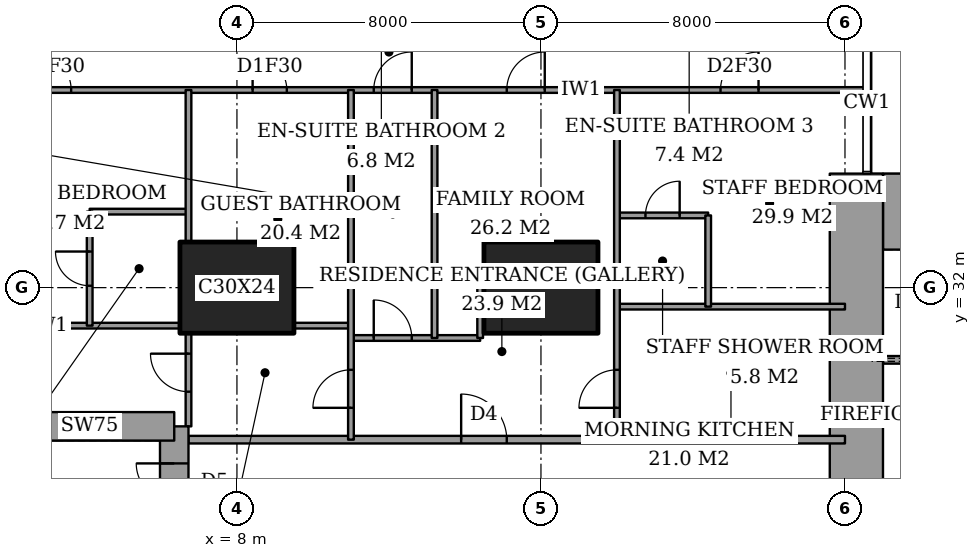
"""IFC4 building model, lengths in metres.
Left out: names, types, materials, properties, quantities, classifications, styles, units other than length and angle.
Written with IfcOpenShell. Run it as: python <this file> out.ifc"""

import sys

from ifc_helpers import new_model, si_unit, direction, frame, frame_2d, origin, origin_2d, place, context, subcontext, project, spatial, rectangle, extrude, element, fill, save


model = new_model("IFC4")
c1 = context("Model", 3, precision=1e-05, world=origin(), true_north=direction((0.0, 1.0)))
c2 = subcontext(c1, "Body", "Model", "MODEL_VIEW")
j1 = project(units=[si_unit("LENGTHUNIT", "METRE"), si_unit("PLANEANGLEUNIT", "RADIAN")], contexts=[c1])
p1 = place(None, origin())
s1 = spatial("IfcSite", under=j1, at=p1, CompositionType="ELEMENT")
p2 = place(p1, origin())
s2 = spatial("IfcBuilding", under=s1, at=p2, CompositionType="ELEMENT")
p3 = place(p2, frame((0.0, 0.0, 207.4)))
s3 = spatial("IfcBuildingStorey", under=s2, at=p3, CompositionType="ELEMENT", Elevation=207.4)
for number, where, z_axis, x_axis in (
    (1, (8.0, 32.0, 0.0), (0.0, 0.0, 1.0), (1.0, 0.0, 0.0)),
    (2, (16.0, 32.0, 0.0), (0.0, 0.0, 1.0), (1.0, 0.0, 0.0)),
):
    element("IfcColumn", number, at=place(p3, frame(where, z_axis=z_axis, x_axis=x_axis)), inside=s3, PredefinedType="COLUMN", context=c2, shape_type="SweptSolid", body=[
        extrude(rectangle(XDim=3.0, YDim=2.4, at=origin_2d()), origin(), (0.0, 0.0, 1.0), 3.6),
    ])
p4 = place(p3, frame((25.0, 34.0, 0.0), z_axis=(0.0, 0.0, 1.0), x_axis=(1.0, 0.0, 0.0)))
e3 = element("IfcWall", 3, at=p4, inside=s3, PredefinedType="SHEAR", context=c2, shape_type="SweptSolid", body=[
    extrude(rectangle(XDim=3.15, YDim=2.0, at=frame_2d((1.575, 0.0))), origin(), (0.0, 0.0, 1.0), 3.6),
])
p5 = place(p3, frame((24.3, 23.15, 0.0), z_axis=(0.0, 0.0, 1.0), x_axis=(0.0, 1.0, 0.0)))
e4 = element("IfcWall", 4, at=p5, inside=s3, PredefinedType="SHEAR", context=c2, shape_type="SweptSolid", body=[
    extrude(rectangle(XDim=11.85, YDim=1.4, at=frame_2d((5.925, 0.0))), origin(), (0.0, 0.0, 1.0), 3.6),
])
p6 = place(p5, frame((0.75, 0.0, 0.0)))
e5 = element("IfcOpeningElement", 5, at=p6, cuts=e4, PredefinedType="OPENING", context=c2, shape_type="SweptSolid", body=[
    extrude(rectangle(XDim=1.8, YDim=2.4, at=frame_2d((0.9, 1.2))), frame((0.0, 0.71, 0.0), z_axis=(0.0, -1.0, 0.0), x_axis=(1.0, 0.0, 0.0)), (0.0, 0.0, 1.0), 1.42),
])
p7 = place(p3, frame((6.35, 19.65, 0.0), z_axis=(0.0, 0.0, 1.0), x_axis=(0.0, 1.0, 0.0)))
e6 = element("IfcWall", 6, at=p7, inside=s3, PredefinedType="SHEAR", context=c2, shape_type="SweptSolid", body=[
    extrude(rectangle(XDim=8.7, YDim=0.75, at=frame_2d((4.35, 0.0))), origin(), (0.0, 0.0, 1.0), 3.6),
])
p8 = place(p7, frame((6.725, 0.0, 0.0)))
e7 = element("IfcOpeningElement", 7, at=p8, cuts=e6, PredefinedType="OPENING", context=c2, shape_type="SweptSolid", body=[
    extrude(rectangle(XDim=1.0, YDim=2.1, at=frame_2d((0.5, 1.05))), frame((0.0, 0.385, 0.0), z_axis=(0.0, -1.0, 0.0), x_axis=(1.0, 0.0, 0.0)), (0.0, 0.0, 1.0), 0.77),
])
p9 = place(p3, frame((6.35, 28.35, 0.0), z_axis=(0.0, 0.0, 1.0), x_axis=(-1.0, 0.0, 0.0)))
e8 = element("IfcWall", 8, at=p9, inside=s3, PredefinedType="SHEAR", context=c2, shape_type="SweptSolid", body=[
    extrude(rectangle(XDim=4.45, YDim=0.75, at=frame_2d((2.225, 0.0))), origin(), (0.0, 0.0, 1.0), 3.6),
])
p10 = place(p3, frame((6.725, 28.0, 0.0), z_axis=(0.0, 0.0, 1.0), x_axis=(1.0, 0.0, 0.0)))
e9 = element("IfcWall", 9, at=p10, inside=s3, PredefinedType="PARTITIONING", context=c2, shape_type="SweptSolid", body=[
    extrude(rectangle(XDim=17.275, YDim=0.2, at=frame_2d((8.637, 0.0))), origin(), (0.0, 0.0, 1.0), 3.35),
])
p11 = place(p10, frame((7.175, 0.0, 0.0)))
e10 = element("IfcOpeningElement", 10, at=p11, cuts=e9, PredefinedType="OPENING", context=c2, shape_type="SweptSolid", body=[
    extrude(rectangle(XDim=1.2, YDim=2.4, at=frame_2d((0.6, 1.2))), frame((0.0, 0.11, 0.0), z_axis=(0.0, -1.0, 0.0), x_axis=(1.0, 0.0, 0.0)), (0.0, 0.0, 1.0), 0.22),
])
p12 = place(p3, frame((11.0, 30.675, 0.0), z_axis=(0.0, 0.0, 1.0), x_axis=(1.0, 0.0, 0.0)))
e11 = element("IfcWall", 11, at=p12, inside=s3, PredefinedType="PARTITIONING", context=c2, shape_type="SweptSolid", body=[
    extrude(rectangle(XDim=3.4, YDim=0.15, at=frame_2d((1.7, 0.0))), origin(), (0.0, 0.0, 1.0), 3.35),
])
p13 = place(p12, frame((0.6, 0.0, 0.0)))
e12 = element("IfcOpeningElement", 12, at=p13, cuts=e11, PredefinedType="OPENING", context=c2, shape_type="SweptSolid", body=[
    extrude(rectangle(XDim=1.0, YDim=2.1, at=frame_2d((0.5, 1.05))), frame((0.0, 0.085, 0.0), z_axis=(0.0, -1.0, 0.0), x_axis=(1.0, 0.0, 0.0)), (0.0, 0.0, 1.0), 0.17),
])
p14 = place(p3, frame((-0.45, 31.0, 0.0), z_axis=(0.0, 0.0, 1.0), x_axis=(1.0, 0.0, 0.0)))
e13 = element("IfcWall", 13, at=p14, inside=s3, PredefinedType="PARTITIONING", context=c2, shape_type="SweptSolid", body=[
    extrude(rectangle(XDim=6.95, YDim=0.15, at=frame_2d((3.475, 0.0))), origin(), (0.0, 0.0, 1.0), 3.35),
])
p15 = place(p3, frame((9.5, 31.0, 0.0), z_axis=(0.0, 0.0, 1.0), x_axis=(1.0, 0.0, 0.0)))
e14 = element("IfcWall", 14, at=p15, inside=s3, PredefinedType="PARTITIONING", context=c2, shape_type="SweptSolid", body=[
    extrude(rectangle(XDim=1.5, YDim=0.15, at=frame_2d((0.75, 0.0))), origin(), (0.0, 0.0, 1.0), 3.35),
])
p16 = place(p3, frame((18.0, 31.5, 0.0), z_axis=(0.0, 0.0, 1.0), x_axis=(1.0, 0.0, 0.0)))
e15 = element("IfcWall", 15, at=p16, inside=s3, PredefinedType="PARTITIONING", context=c2, shape_type="SweptSolid", body=[
    extrude(rectangle(XDim=6.0, YDim=0.15, at=frame_2d((3.0, 0.0))), origin(), (0.0, 0.0, 1.0), 3.35),
])
p17 = place(p3, frame((17.5, 32.1, 0.0), z_axis=(0.0, 0.0, 1.0), x_axis=(1.0, 0.0, 0.0)))
e16 = element("IfcWall", 16, at=p17, inside=s3, PredefinedType="PARTITIONING", context=c2, shape_type="SweptSolid", body=[
    extrude(rectangle(XDim=0.5, YDim=0.15, at=frame_2d((0.25, 0.0))), origin(), (0.0, 0.0, 1.0), 2.634),
])
p18 = place(p3, frame((18.0, 33.9, 0.0), z_axis=(0.0, 0.0, 1.0), x_axis=(1.0, 0.0, 0.0)))
e17 = element("IfcWall", 17, at=p18, inside=s3, PredefinedType="PARTITIONING", context=c2, shape_type="SweptSolid", body=[
    extrude(rectangle(XDim=2.4, YDim=0.15, at=frame_2d((1.2, 0.0))), origin(), (0.0, 0.0, 1.0), 3.35),
])
p19 = place(p18, frame((0.75, 0.0, 0.0)))
e18 = element("IfcOpeningElement", 18, at=p19, cuts=e17, PredefinedType="OPENING", context=c2, shape_type="SweptSolid", body=[
    extrude(rectangle(XDim=0.9, YDim=2.1, at=frame_2d((0.45, 1.05))), frame((0.0, 0.085, 0.0), z_axis=(0.0, -1.0, 0.0), x_axis=(1.0, 0.0, 0.0)), (0.0, 0.0, 1.0), 0.17),
])
p20 = place(p3, frame((4.125, 34.0, 0.0), z_axis=(0.0, 0.0, 1.0), x_axis=(1.0, 0.0, 0.0)))
e19 = element("IfcWall", 19, at=p20, inside=s3, PredefinedType="PARTITIONING", context=c2, shape_type="SweptSolid", body=[
    extrude(rectangle(XDim=2.6, YDim=0.15, at=frame_2d((1.3, 0.0))), origin(), (0.0, 0.0, 1.0), 3.35),
])
p21 = place(p3, frame((-0.45, 37.2, 0.0), z_axis=(0.0, 0.0, 1.0), x_axis=(1.0, 0.0, 0.0)))
e20 = element("IfcWall", 20, at=p21, inside=s3, PredefinedType="PARTITIONING", context=c2, shape_type="SweptSolid", body=[
    extrude(rectangle(XDim=25.011, YDim=0.15, at=frame_2d((12.505, 0.0))), origin(), (0.0, 0.0, 1.0), 3.35),
])
p22 = place(p21, frame((12.05, 0.0, 0.0)))
e21 = element("IfcOpeningElement", 21, at=p22, cuts=e20, PredefinedType="OPENING", context=c2, shape_type="SweptSolid", body=[
    extrude(rectangle(XDim=1.0, YDim=2.1, at=frame_2d((0.5, 1.05))), frame((0.0, 0.085, 0.0), z_axis=(0.0, -1.0, 0.0), x_axis=(1.0, 0.0, 0.0)), (0.0, 0.0, 1.0), 0.17),
])
p23 = place(p21, frame((3.087, 0.0, 0.0)))
e22 = element("IfcOpeningElement", 22, at=p23, cuts=e20, PredefinedType="OPENING", context=c2, shape_type="SweptSolid", body=[
    extrude(rectangle(XDim=1.0, YDim=2.1, at=frame_2d((0.5, 1.05))), frame((0.0, 0.085, 0.0), z_axis=(0.0, -1.0, 0.0), x_axis=(1.0, 0.0, 0.0)), (0.0, 0.0, 1.0), 0.17),
])
p24 = place(p21, frame((8.863, 0.0, 0.0)))
e23 = element("IfcOpeningElement", 23, at=p24, cuts=e20, PredefinedType="OPENING", context=c2, shape_type="SweptSolid", body=[
    extrude(rectangle(XDim=0.9, YDim=2.1, at=frame_2d((0.45, 1.05))), frame((0.0, 0.085, 0.0), z_axis=(0.0, -1.0, 0.0), x_axis=(1.0, 0.0, 0.0)), (0.0, 0.0, 1.0), 0.17),
])
p25 = place(p21, frame((15.55, 0.0, 0.0)))
e24 = element("IfcOpeningElement", 24, at=p25, cuts=e20, PredefinedType="OPENING", context=c2, shape_type="SweptSolid", body=[
    extrude(rectangle(XDim=1.0, YDim=2.1, at=frame_2d((0.5, 1.05))), frame((0.0, 0.085, 0.0), z_axis=(0.0, -1.0, 0.0), x_axis=(1.0, 0.0, 0.0)), (0.0, 0.0, 1.0), 0.17),
])
p26 = place(p21, frame((21.175, 0.0, 0.0)))
e25 = element("IfcOpeningElement", 25, at=p26, cuts=e20, PredefinedType="OPENING", context=c2, shape_type="SweptSolid", body=[
    extrude(rectangle(XDim=1.0, YDim=2.1, at=frame_2d((0.5, 1.05))), frame((0.0, 0.085, 0.0), z_axis=(0.0, -1.0, 0.0), x_axis=(1.0, 0.0, 0.0)), (0.0, 0.0, 1.0), 0.17),
])
p27 = place(p3, frame((4.125, 31.0, 0.0), z_axis=(0.0, 0.0, 1.0), x_axis=(0.0, 1.0, 0.0)))
e26 = element("IfcWall", 26, at=p27, inside=s3, PredefinedType="PARTITIONING", context=c2, shape_type="SweptSolid", body=[
    extrude(rectangle(XDim=3.0, YDim=0.15, at=frame_2d((1.5, 0.0))), origin(), (0.0, 0.0, 1.0), 3.35),
])
p28 = place(p27, frame((1.05, 0.0, 0.0)))
e27 = element("IfcOpeningElement", 27, at=p28, cuts=e26, PredefinedType="OPENING", context=c2, shape_type="SweptSolid", body=[
    extrude(rectangle(XDim=0.9, YDim=2.1, at=frame_2d((0.45, 1.05))), frame((0.0, 0.085, 0.0), z_axis=(0.0, -1.0, 0.0), x_axis=(1.0, 0.0, 0.0)), (0.0, 0.0, 1.0), 0.17),
])
p29 = place(p3, frame((6.725, 28.35, 0.0), z_axis=(0.0, 0.0, 1.0), x_axis=(0.0, 1.0, 0.0)))
e28 = element("IfcWall", 28, at=p29, inside=s3, PredefinedType="PARTITIONING", context=c2, shape_type="SweptSolid", body=[
    extrude(rectangle(XDim=2.45, YDim=0.15, at=frame_2d((1.225, 0.0))), origin(), (0.0, 0.0, 1.0), 3.35),
])
p30 = place(p29, frame((0.913, 0.0, 0.0)))
e29 = element("IfcOpeningElement", 29, at=p30, cuts=e28, PredefinedType="OPENING", context=c2, shape_type="SweptSolid", body=[
    extrude(rectangle(XDim=1.0, YDim=2.1, at=frame_2d((0.5, 1.05))), frame((0.0, 0.085, 0.0), z_axis=(0.0, -1.0, 0.0), x_axis=(1.0, 0.0, 0.0)), (0.0, 0.0, 1.0), 0.17),
])
p31 = place(p3, frame((6.725, 33.2, 0.0), z_axis=(0.0, 0.0, 1.0), x_axis=(0.0, 1.0, 0.0)))
e30 = element("IfcWall", 30, at=p31, inside=s3, PredefinedType="PARTITIONING", context=c2, shape_type="SweptSolid", body=[
    extrude(rectangle(XDim=4.0, YDim=0.15, at=frame_2d((2.0, 0.0))), origin(), (0.0, 0.0, 1.0), 3.35),
])
p32 = place(p3, frame((11.0, 28.0, 0.0), z_axis=(0.0, 0.0, 1.0), x_axis=(0.0, 1.0, 0.0)))
e31 = element("IfcWall", 31, at=p32, inside=s3, PredefinedType="PARTITIONING", context=c2, shape_type="SweptSolid", body=[
    extrude(rectangle(XDim=9.2, YDim=0.15, at=frame_2d((4.6, 0.0))), origin(), (0.0, 0.0, 1.0), 3.35),
])
p33 = place(p32, frame((0.837, 0.0, 0.0)))
e32 = element("IfcOpeningElement", 32, at=p33, cuts=e31, PredefinedType="OPENING", context=c2, shape_type="SweptSolid", body=[
    extrude(rectangle(XDim=1.0, YDim=2.1, at=frame_2d((0.5, 1.05))), frame((0.0, 0.085, 0.0), z_axis=(0.0, -1.0, 0.0), x_axis=(1.0, 0.0, 0.0)), (0.0, 0.0, 1.0), 0.17),
])
p34 = place(p3, frame((13.2, 30.675, 0.0), z_axis=(0.0, 0.0, 1.0), x_axis=(0.0, 1.0, 0.0)))
e33 = element("IfcWall", 33, at=p34, inside=s3, PredefinedType="PARTITIONING", context=c2, shape_type="SweptSolid", body=[
    extrude(rectangle(XDim=6.525, YDim=0.15, at=frame_2d((3.262, 0.0))), origin(), (0.0, 0.0, 1.0), 3.35),
])
p35 = place(p3, frame((14.4, 30.675, 0.0), z_axis=(0.0, 0.0, 1.0), x_axis=(0.0, 1.0, 0.0)))
e34 = element("IfcWall", 34, at=p35, inside=s3, PredefinedType="PARTITIONING", context=c2, shape_type="SweptSolid", body=[
    extrude(rectangle(XDim=1.425, YDim=0.15, at=frame_2d((0.712, 0.0))), origin(), (0.0, 0.0, 1.0), 3.35),
])
p36 = place(p3, frame((18.0, 28.0, 0.0), z_axis=(0.0, 0.0, 1.0), x_axis=(0.0, 1.0, 0.0)))
e35 = element("IfcWall", 35, at=p36, inside=s3, PredefinedType="PARTITIONING", context=c2, shape_type="SweptSolid", body=[
    extrude(rectangle(XDim=9.2, YDim=0.15, at=frame_2d((4.6, 0.0))), origin(), (0.0, 0.0, 1.0), 3.35),
])
p37 = place(p36, frame((0.837, 0.0, 0.0)))
e36 = element("IfcOpeningElement", 36, at=p37, cuts=e35, PredefinedType="OPENING", context=c2, shape_type="SweptSolid", body=[
    extrude(rectangle(XDim=1.0, YDim=2.1, at=frame_2d((0.5, 1.05))), frame((0.0, 0.085, 0.0), z_axis=(0.0, -1.0, 0.0), x_axis=(1.0, 0.0, 0.0)), (0.0, 0.0, 1.0), 0.17),
])
p38 = place(p3, frame((20.4, 31.5, 0.0), z_axis=(0.0, 0.0, 1.0), x_axis=(0.0, 1.0, 0.0)))
e37 = element("IfcWall", 37, at=p38, inside=s3, PredefinedType="PARTITIONING", context=c2, shape_type="SweptSolid", body=[
    extrude(rectangle(XDim=2.4, YDim=0.15, at=frame_2d((1.2, 0.0))), origin(), (0.0, 0.0, 1.0), 3.35),
])
p39 = place(p3, frame((25.0, 30.1, 0.0), z_axis=(0.0, 0.0, 1.0), x_axis=(1.0, 0.0, 0.0)))
e38 = element("IfcWall", 38, at=p39, inside=s3, PredefinedType="PARTITIONING", context=c2, shape_type="SweptSolid", body=[
    extrude(rectangle(XDim=12.7, YDim=0.2, at=frame_2d((6.35, 0.0))), origin(), (0.0, 0.0, 1.0), 3.6),
])
p40 = place(p39, frame((4.25, 0.0, 0.0)))
e39 = element("IfcOpeningElement", 39, at=p40, cuts=e38, PredefinedType="OPENING", context=c2, shape_type="SweptSolid", body=[
    extrude(rectangle(XDim=1.1, YDim=2.1, at=frame_2d((0.55, 1.05))), frame((0.0, 0.11, 0.0), z_axis=(0.0, -1.0, 0.0), x_axis=(1.0, 0.0, 0.0)), (0.0, 0.0, 1.0), 0.22),
])
p41 = place(p39, frame((7.45, 0.0, 0.0)))
e40 = element("IfcOpeningElement", 40, at=p41, cuts=e38, PredefinedType="OPENING", context=c2, shape_type="SweptSolid", body=[
    extrude(rectangle(XDim=1.1, YDim=2.1, at=frame_2d((0.55, 1.05))), frame((0.0, 0.11, 0.0), z_axis=(0.0, -1.0, 0.0), x_axis=(1.0, 0.0, 0.0)), (0.0, 0.0, 1.0), 0.22),
])
p42 = place(p39, frame((10.65, 0.0, 0.0)))
e41 = element("IfcOpeningElement", 41, at=p42, cuts=e38, PredefinedType="OPENING", context=c2, shape_type="SweptSolid", body=[
    extrude(rectangle(XDim=1.1, YDim=2.1, at=frame_2d((0.55, 1.05))), frame((0.0, 0.11, 0.0), z_axis=(0.0, -1.0, 0.0), x_axis=(1.0, 0.0, 0.0)), (0.0, 0.0, 1.0), 0.22),
])
p43 = place(p39, frame((0.9, 0.0, 0.0)))
e42 = element("IfcOpeningElement", 42, at=p43, cuts=e38, PredefinedType="OPENING", context=c2, shape_type="SweptSolid", body=[
    extrude(rectangle(XDim=1.2, YDim=2.1, at=frame_2d((0.6, 1.05))), frame((0.0, 0.11, 0.0), z_axis=(0.0, -1.0, 0.0), x_axis=(1.0, 0.0, 0.0)), (0.0, 0.0, 1.0), 0.22),
])
p44 = place(p22, origin())
e43 = element("IfcDoor", 43, at=p44, inside=s3, OperationType="SINGLE_SWING_LEFT", PredefinedType="DOOR", context=c2, shape_type="SweptSolid", body=[
    extrude(rectangle(XDim=1.0, YDim=2.1, at=frame_2d((0.5, 1.05))), frame((0.0, 0.025, 0.0), z_axis=(0.0, -1.0, 0.0), x_axis=(1.0, 0.0, 0.0)), (0.0, 0.0, 1.0), 0.05),
])
fill(e21, e43)
p45 = place(p28, origin())
e44 = element("IfcDoor", 44, at=p45, inside=s3, OperationType="SINGLE_SWING_LEFT", PredefinedType="DOOR", context=c2, shape_type="SweptSolid", body=[
    extrude(rectangle(XDim=0.9, YDim=2.1, at=frame_2d((0.45, 1.05))), frame((0.0, 0.025, 0.0), z_axis=(0.0, -1.0, 0.0), x_axis=(1.0, 0.0, 0.0)), (0.0, 0.0, 1.0), 0.05),
])
fill(e27, e44)
p46 = place(p23, origin())
e45 = element("IfcDoor", 45, at=p46, inside=s3, OperationType="SINGLE_SWING_RIGHT", PredefinedType="DOOR", context=c2, shape_type="SweptSolid", body=[
    extrude(rectangle(XDim=1.0, YDim=2.1, at=frame_2d((0.5, 1.05))), frame((0.0, 0.025, 0.0), z_axis=(0.0, -1.0, 0.0), x_axis=(1.0, 0.0, 0.0)), (0.0, 0.0, 1.0), 0.05),
])
fill(e22, e45)
p47 = place(p30, origin())
e46 = element("IfcDoor", 46, at=p47, inside=s3, OperationType="SINGLE_SWING_LEFT", PredefinedType="DOOR", context=c2, shape_type="SweptSolid", body=[
    extrude(rectangle(XDim=1.0, YDim=2.1, at=frame_2d((0.5, 1.05))), frame((0.0, 0.025, 0.0), z_axis=(0.0, -1.0, 0.0), x_axis=(1.0, 0.0, 0.0)), (0.0, 0.0, 1.0), 0.05),
])
fill(e29, e46)
p48 = place(p24, origin())
e47 = element("IfcDoor", 47, at=p48, inside=s3, OperationType="SINGLE_SWING_RIGHT", PredefinedType="DOOR", context=c2, shape_type="SweptSolid", body=[
    extrude(rectangle(XDim=0.9, YDim=2.1, at=frame_2d((0.45, 1.05))), frame((0.0, 0.025, 0.0), z_axis=(0.0, -1.0, 0.0), x_axis=(1.0, 0.0, 0.0)), (0.0, 0.0, 1.0), 0.05),
])
fill(e23, e47)
p49 = place(p33, origin())
e48 = element("IfcDoor", 48, at=p49, inside=s3, OperationType="SINGLE_SWING_RIGHT", PredefinedType="DOOR", context=c2, shape_type="SweptSolid", body=[
    extrude(rectangle(XDim=1.0, YDim=2.1, at=frame_2d((0.5, 1.05))), frame((0.0, 0.025, 0.0), z_axis=(0.0, -1.0, 0.0), x_axis=(1.0, 0.0, 0.0)), (0.0, 0.0, 1.0), 0.05),
])
fill(e32, e48)
p50 = place(p11, origin())
e49 = element("IfcDoor", 49, at=p50, inside=s3, OperationType="SINGLE_SWING_RIGHT", PredefinedType="DOOR", context=c2, shape_type="SweptSolid", body=[
    extrude(rectangle(XDim=1.2, YDim=2.4, at=frame_2d((0.6, 1.2))), frame((0.0, 0.025, 0.0), z_axis=(0.0, -1.0, 0.0), x_axis=(1.0, 0.0, 0.0)), (0.0, 0.0, 1.0), 0.05),
])
fill(e10, e49)
p51 = place(p13, origin())
e50 = element("IfcDoor", 50, at=p51, inside=s3, OperationType="SINGLE_SWING_RIGHT", PredefinedType="DOOR", context=c2, shape_type="SweptSolid", body=[
    extrude(rectangle(XDim=1.0, YDim=2.1, at=frame_2d((0.5, 1.05))), frame((0.0, 0.025, 0.0), z_axis=(0.0, -1.0, 0.0), x_axis=(1.0, 0.0, 0.0)), (0.0, 0.0, 1.0), 0.05),
])
fill(e12, e50)
p52 = place(p25, origin())
e51 = element("IfcDoor", 51, at=p52, inside=s3, OperationType="SINGLE_SWING_LEFT", PredefinedType="DOOR", context=c2, shape_type="SweptSolid", body=[
    extrude(rectangle(XDim=1.0, YDim=2.1, at=frame_2d((0.5, 1.05))), frame((0.0, 0.025, 0.0), z_axis=(0.0, -1.0, 0.0), x_axis=(1.0, 0.0, 0.0)), (0.0, 0.0, 1.0), 0.05),
])
fill(e24, e51)
p53 = place(p19, origin())
e52 = element("IfcDoor", 52, at=p53, inside=s3, OperationType="SINGLE_SWING_LEFT", PredefinedType="DOOR", context=c2, shape_type="SweptSolid", body=[
    extrude(rectangle(XDim=0.9, YDim=2.1, at=frame_2d((0.45, 1.05))), frame((0.0, 0.025, 0.0), z_axis=(0.0, -1.0, 0.0), x_axis=(1.0, 0.0, 0.0)), (0.0, 0.0, 1.0), 0.05),
])
fill(e18, e52)
p54 = place(p26, origin())
e53 = element("IfcDoor", 53, at=p54, inside=s3, OperationType="SINGLE_SWING_LEFT", PredefinedType="DOOR", context=c2, shape_type="SweptSolid", body=[
    extrude(rectangle(XDim=1.0, YDim=2.1, at=frame_2d((0.5, 1.05))), frame((0.0, 0.025, 0.0), z_axis=(0.0, -1.0, 0.0), x_axis=(1.0, 0.0, 0.0)), (0.0, 0.0, 1.0), 0.05),
])
fill(e25, e53)
p55 = place(p37, origin())
e54 = element("IfcDoor", 54, at=p55, inside=s3, OperationType="SINGLE_SWING_RIGHT", PredefinedType="DOOR", context=c2, shape_type="SweptSolid", body=[
    extrude(rectangle(XDim=1.0, YDim=2.1, at=frame_2d((0.5, 1.05))), frame((0.0, 0.025, 0.0), z_axis=(0.0, -1.0, 0.0), x_axis=(1.0, 0.0, 0.0)), (0.0, 0.0, 1.0), 0.05),
])
fill(e36, e54)
p56 = place(p8, origin())
e55 = element("IfcDoor", 55, at=p56, inside=s3, OperationType="SINGLE_SWING_LEFT", PredefinedType="DOOR", context=c2, shape_type="SweptSolid", body=[
    extrude(rectangle(XDim=1.0, YDim=2.1, at=frame_2d((0.5, 1.05))), frame((0.0, 0.025, 0.0), z_axis=(0.0, -1.0, 0.0), x_axis=(1.0, 0.0, 0.0)), (0.0, 0.0, 1.0), 0.05),
])
fill(e7, e55)
save(model, sys.argv[1])
